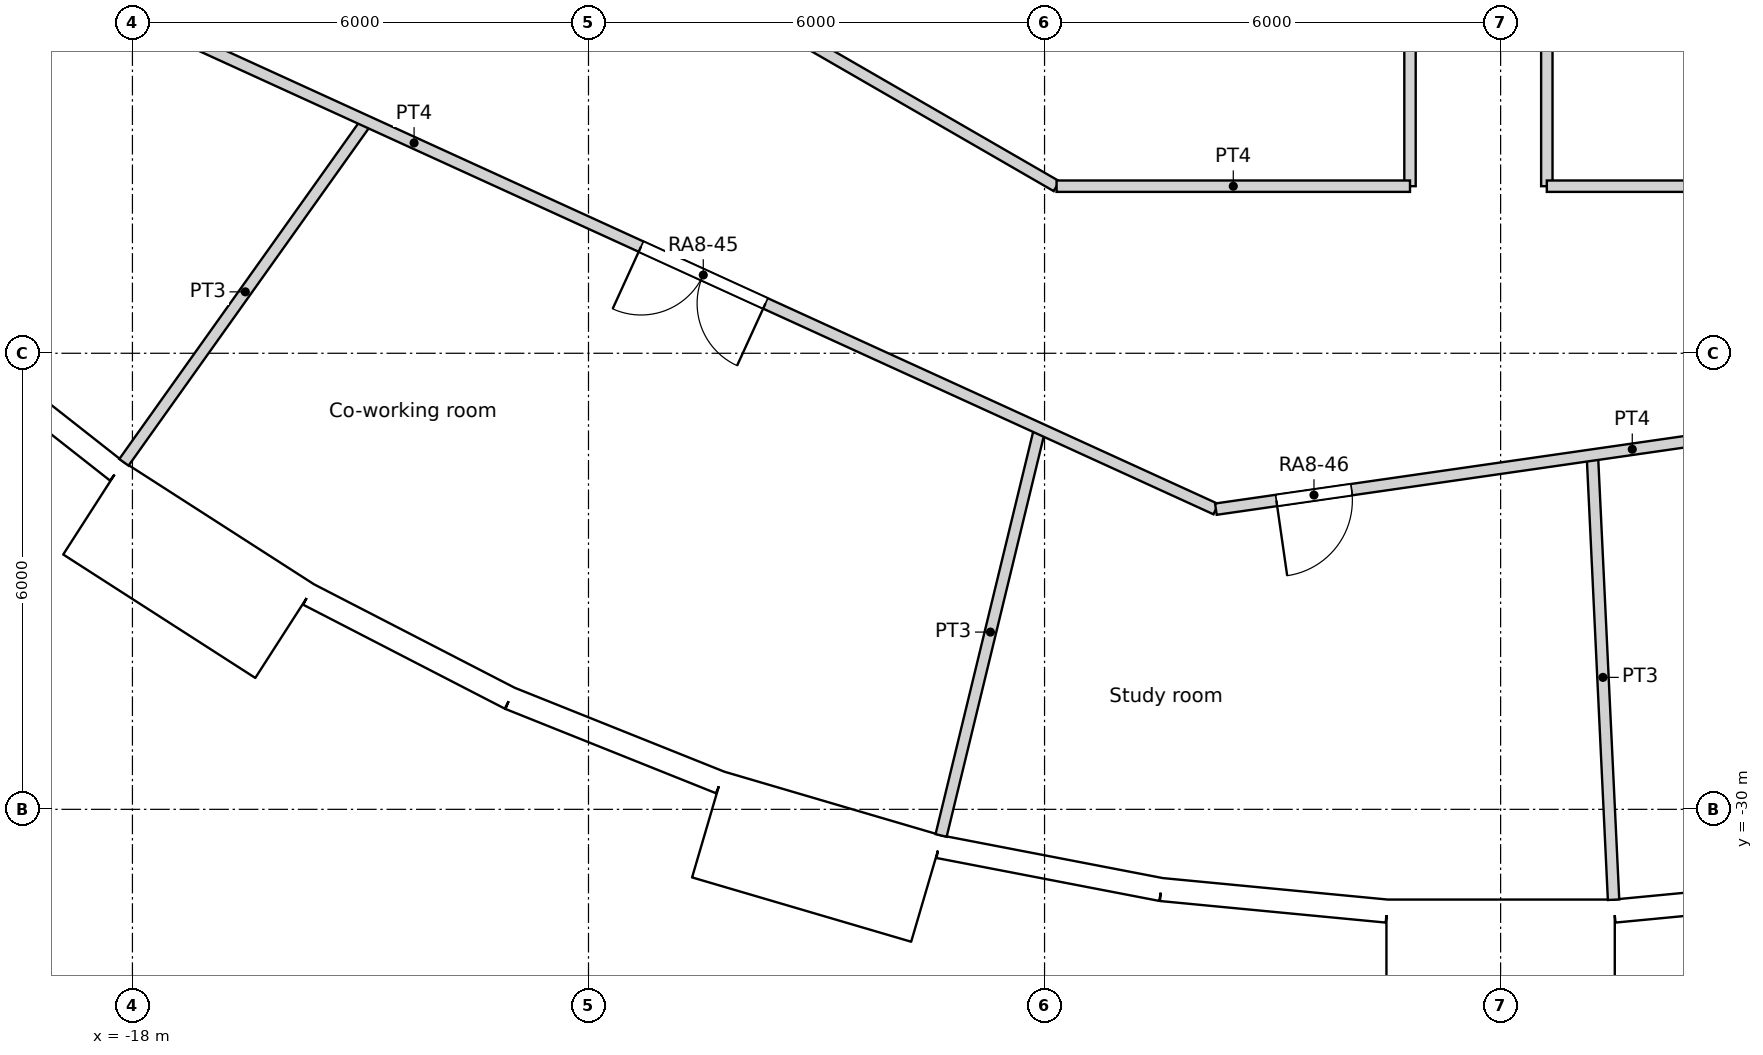
"""IFC4 building model, lengths in metres.
Left out: names, types, materials, properties, quantities, classifications, styles, units other than length and angle.
Written with IfcOpenShell. Run it as: python <this file> out.ifc"""

import sys

from ifc_helpers import new_model, si_unit, direction, frame, frame_2d, origin, origin_2d, place, context, subcontext, project, spatial, rectangle, circle, extrude, element, fill, save


model = new_model("IFC4")
c1 = context("Model", 3, precision=1e-05, world=origin(), true_north=direction((0.0, 1.0)))
c2 = subcontext(c1, "Body", "Model", "MODEL_VIEW")
j1 = project(units=[si_unit("LENGTHUNIT", "METRE"), si_unit("PLANEANGLEUNIT", "RADIAN")], contexts=[c1])
p1 = place(None, origin())
s1 = spatial("IfcSite", under=j1, at=p1, CompositionType="ELEMENT")
p2 = place(p1, origin())
s2 = spatial("IfcBuilding", under=s1, at=p2, CompositionType="ELEMENT")
p3 = place(p2, frame((0.0, 0.0, 103.8)))
s3 = spatial("IfcBuildingStorey", under=s2, at=p3, CompositionType="ELEMENT", Elevation=103.8)
for number, where, z_axis, x_axis in (
    (1, (-15.137, -26.219, 0.0), (0.0, 0.0, 1.0), (1.0, 0.0, 0.0)),
    (2, (-9.902, -28.61, 0.0), (0.0, 0.0, 1.0), (1.0, 0.0, 0.0)),
    (3, (-4.309, -29.966, 0.0), (0.0, 0.0, 1.0), (1.0, 0.0, 0.0)),
    (4, (1.44, -30.24, 0.0), (0.0, 0.0, 1.0), (1.0, 0.0, 0.0)),
):
    element("IfcColumn", number, at=place(p3, frame(where, z_axis=z_axis, x_axis=x_axis)), inside=s3, PredefinedType="COLUMN", context=c2, shape_type="SweptSolid", body=[
        extrude(circle(Radius=0.6, at=origin_2d()), origin(), (0.0, 0.0, 1.0), 3.6),
    ])
for number, where, z_axis, x_axis in (
    (5, (-12.274, -21.259, 0.0), (0.0, 0.0, 1.0), (1.0, 0.0, 0.0)),
    (6, (-7.04, -23.516, 0.0), (0.0, 0.0, 1.0), (1.0, 0.0, 0.0)),
    (7, (-1.427, -24.506, 0.0), (0.0, 0.0, 1.0), (1.0, 0.0, 0.0)),
):
    element("IfcColumn", number, at=place(p3, frame(where, z_axis=z_axis, x_axis=x_axis)), inside=s3, PredefinedType="COLUMN", context=c2, shape_type="SweptSolid", body=[
        extrude(circle(Radius=0.65, at=origin_2d()), origin(), (0.0, 0.0, 1.0), 3.6),
    ])
p4 = place(p3, frame((-20.546, -23.711, 0.0), z_axis=(0.0, 0.0, 1.0), x_axis=(0.786045331304, -0.618168858108, 0.0)))
e8 = element("IfcWall", 8, at=p4, inside=s3, PredefinedType="SOLIDWALL", context=c2, shape_type="SweptSolid", body=[
    extrude(rectangle(XDim=2.98, YDim=0.3, at=frame_2d((1.49, 0.0))), origin(), (0.0, 0.0, 1.0), 3.15),
])
p5 = place(p4, frame((1.49, 0.0, 1.55)))
e9 = element("IfcOpeningElement", 9, at=p5, cuts=e8, PredefinedType="OPENING", context=c2, shape_type="SweptSolid", body=[
    extrude(circle(Radius=0.9, at=origin_2d()), frame((0.0, 0.16, 0.0), z_axis=(0.0, -1.0, 0.0), x_axis=(1.0, 0.0, 0.0)), (0.0, 0.0, 1.0), 0.32),
])
p6 = place(p3, frame((-18.516, -26.037, -0.45), z_axis=(0.0, 0.0, 1.0), x_axis=(0.841223422347, -0.540687667415, 0.0)))
e10 = element("IfcWall", 10, at=p6, inside=s3, PredefinedType="ELEMENTEDWALL", context=c2, shape_type="SweptSolid", body=[
    extrude(rectangle(XDim=3.0, YDim=1.45, at=frame_2d((1.5, 0.0))), origin(), (0.0, 0.0, 1.0), 3.6),
])
p7 = place(p6, frame((1.5, 0.0, 2.0)))
e11 = element("IfcOpeningElement", 11, at=p7, cuts=e10, PredefinedType="OPENING", context=c2, shape_type="SweptSolid", body=[
    extrude(circle(Radius=0.9, at=origin_2d()), frame((0.0, 0.735, 0.0), z_axis=(0.0, -1.0, 0.0), x_axis=(1.0, 0.0, 0.0)), (0.0, 0.0, 1.0), 1.47),
])
p8 = place(p3, frame((-15.682, -27.174, 0.0), z_axis=(0.0, 0.0, 1.0), x_axis=(0.888819853856, -0.458256770153, 0.0)))
e12 = element("IfcWall", 12, at=p8, inside=s3, PredefinedType="SOLIDWALL", context=c2, shape_type="SweptSolid", body=[
    extrude(rectangle(XDim=2.98, YDim=0.3, at=frame_2d((1.49, 0.0))), origin(), (0.0, 0.0, 1.0), 3.15),
])
p9 = place(p8, frame((1.49, 0.0, 1.55)))
e13 = element("IfcOpeningElement", 13, at=p9, cuts=e12, PredefinedType="OPENING", context=c2, shape_type="SweptSolid", body=[
    extrude(circle(Radius=0.9, at=origin_2d()), frame((0.0, 0.16, 0.0), z_axis=(0.0, -1.0, 0.0), x_axis=(1.0, 0.0, 0.0)), (0.0, 0.0, 1.0), 0.32),
])
p10 = place(p3, frame((-13.033, -28.539, 0.0), z_axis=(0.0, 0.0, 1.0), x_axis=(0.928403213937, -0.371574316054, 0.0)))
e14 = element("IfcWall", 14, at=p10, inside=s3, PredefinedType="SOLIDWALL", context=c2, shape_type="SweptSolid", body=[
    extrude(rectangle(XDim=2.98, YDim=0.3, at=frame_2d((1.49, 0.0))), origin(), (0.0, 0.0, 1.0), 3.15),
])
p11 = place(p10, frame((1.49, 0.0, 1.55)))
e15 = element("IfcOpeningElement", 15, at=p11, cuts=e14, PredefinedType="OPENING", context=c2, shape_type="SweptSolid", body=[
    extrude(circle(Radius=0.9, at=origin_2d()), frame((0.0, 0.16, 0.0), z_axis=(0.0, -1.0, 0.0), x_axis=(1.0, 0.0, 0.0)), (0.0, 0.0, 1.0), 0.32),
])
p12 = place(p3, frame((-10.43, -30.198, -0.45), z_axis=(0.0, 0.0, 1.0), x_axis=(0.959489813418, -0.281743319258, 0.0)))
e16 = element("IfcWall", 16, at=p12, inside=s3, PredefinedType="ELEMENTEDWALL", context=c2, shape_type="SweptSolid", body=[
    extrude(rectangle(XDim=3.0, YDim=1.45, at=frame_2d((1.5, 0.0))), origin(), (0.0, 0.0, 1.0), 3.6),
])
p13 = place(p12, frame((1.5, 0.0, 2.0)))
e17 = element("IfcOpeningElement", 17, at=p13, cuts=e16, PredefinedType="OPENING", context=c2, shape_type="SweptSolid", body=[
    extrude(circle(Radius=0.9, at=origin_2d()), frame((0.0, 0.735, 0.0), z_axis=(0.0, -1.0, 0.0), x_axis=(1.0, 0.0, 0.0)), (0.0, 0.0, 1.0), 1.47),
])
p14 = place(p3, frame((-7.391, -30.491, 0.0), z_axis=(0.0, 0.0, 1.0), x_axis=(0.981924535406, -0.189272836848, 0.0)))
e18 = element("IfcWall", 18, at=p14, inside=s3, PredefinedType="SOLIDWALL", context=c2, shape_type="SweptSolid", body=[
    extrude(rectangle(XDim=2.98, YDim=0.3, at=frame_2d((1.49, 0.0))), origin(), (0.0, 0.0, 1.0), 3.15),
])
p15 = place(p14, frame((1.49, 0.0, 1.55)))
e19 = element("IfcOpeningElement", 19, at=p15, cuts=e18, PredefinedType="OPENING", context=c2, shape_type="SweptSolid", body=[
    extrude(circle(Radius=0.9, at=origin_2d()), frame((0.0, 0.16, 0.0), z_axis=(0.0, -1.0, 0.0), x_axis=(1.0, 0.0, 0.0)), (0.0, 0.0, 1.0), 0.32),
])
p16 = place(p3, frame((-4.465, -31.055, 0.0), z_axis=(0.0, 0.0, 1.0), x_axis=(0.995473351551, -0.095041077185, 0.0)))
e20 = element("IfcWall", 20, at=p16, inside=s3, PredefinedType="SOLIDWALL", context=c2, shape_type="SweptSolid", body=[
    extrude(rectangle(XDim=2.98, YDim=0.3, at=frame_2d((1.49, 0.0))), origin(), (0.0, 0.0, 1.0), 3.15),
])
p17 = place(p16, frame((1.49, 0.0, 1.55)))
e21 = element("IfcOpeningElement", 21, at=p17, cuts=e20, PredefinedType="OPENING", context=c2, shape_type="SweptSolid", body=[
    extrude(circle(Radius=0.9, at=origin_2d()), frame((0.0, 0.16, 0.0), z_axis=(0.0, -1.0, 0.0), x_axis=(1.0, 0.0, 0.0)), (0.0, 0.0, 1.0), 0.32),
])
p18 = place(p3, frame((-1.5, -31.914, -0.45), z_axis=(0.0, 0.0, 1.0), x_axis=(1.0, 0.0, 0.0)))
e22 = element("IfcWall", 22, at=p18, inside=s3, PredefinedType="ELEMENTEDWALL", context=c2, shape_type="SweptSolid", body=[
    extrude(rectangle(XDim=3.0, YDim=1.45, at=frame_2d((1.5, 0.0))), origin(), (0.0, 0.0, 1.0), 3.6),
])
p19 = place(p18, frame((1.5, 0.0, 2.0)))
e23 = element("IfcOpeningElement", 23, at=p19, cuts=e22, PredefinedType="OPENING", context=c2, shape_type="SweptSolid", body=[
    extrude(circle(Radius=0.9, at=origin_2d()), frame((0.0, 0.735, 0.0), z_axis=(0.0, -1.0, 0.0), x_axis=(1.0, 0.0, 0.0)), (0.0, 0.0, 1.0), 1.47),
])
p20 = place(p3, frame((1.499, -31.338, 0.0), z_axis=(0.0, 0.0, 1.0), x_axis=(0.995473351551, 0.095041077185, 0.0)))
e24 = element("IfcWall", 24, at=p20, inside=s3, PredefinedType="SOLIDWALL", context=c2, shape_type="SweptSolid", body=[
    extrude(rectangle(XDim=2.98, YDim=0.3, at=frame_2d((1.49, 0.0))), origin(), (0.0, 0.0, 1.0), 3.15),
])
p21 = place(p20, frame((1.49, 0.0, 1.55)))
e25 = element("IfcOpeningElement", 25, at=p21, cuts=e24, PredefinedType="OPENING", context=c2, shape_type="SweptSolid", body=[
    extrude(circle(Radius=0.9, at=origin_2d()), frame((0.0, 0.16, 0.0), z_axis=(0.0, -1.0, 0.0), x_axis=(1.0, 0.0, 0.0)), (0.0, 0.0, 1.0), 0.32),
])
p22 = place(p3, frame((-14.0, -17.092, 0.0), z_axis=(0.0, 0.0, 1.0), x_axis=(0.86602719091, -0.499996904595, 0.0)))
e26 = element("IfcWall", 26, at=p22, inside=s3, PredefinedType="PARTITIONING", context=c2, shape_type="SweptSolid", body=[
    extrude(rectangle(XDim=9.42, YDim=0.15, at=frame_2d((4.71, 0.0))), origin(), (0.0, 0.0, 1.0), 3.15),
])
p23 = place(p3, frame((-5.842, -21.802, 0.0), z_axis=(0.0, 0.0, 1.0), x_axis=(1.0, 0.0, 0.0)))
e27 = element("IfcWall", 27, at=p23, inside=s3, PredefinedType="PARTITIONING", context=c2, shape_type="SweptSolid", body=[
    extrude(rectangle(XDim=4.65, YDim=0.15, at=frame_2d((2.325, 0.0))), origin(), (0.0, 0.0, 1.0), 3.15),
])
p24 = place(p3, frame((-1.192, -21.802, 0.0), z_axis=(0.0, 0.0, 1.0), x_axis=(0.0, 1.0, 0.0)))
e28 = element("IfcWall", 28, at=p24, inside=s3, PredefinedType="PARTITIONING", context=c2, shape_type="SweptSolid", body=[
    extrude(rectangle(XDim=10.002, YDim=0.15, at=frame_2d((5.001, 0.0))), origin(), (0.0, 0.0, 1.0), 3.15),
])
p25 = place(p3, frame((0.608, -21.802, 0.0), z_axis=(0.0, 0.0, 1.0), x_axis=(0.0, 1.0, 0.0)))
e29 = element("IfcWall", 29, at=p25, inside=s3, PredefinedType="PARTITIONING", context=c2, shape_type="SweptSolid", body=[
    extrude(rectangle(XDim=10.002, YDim=0.15, at=frame_2d((5.001, 0.0))), origin(), (0.0, 0.0, 1.0), 3.15),
])
p26 = place(p25, frame((4.526, 0.0, 0.0)))
e30 = element("IfcOpeningElement", 30, at=p26, cuts=e29, PredefinedType="OPENING", context=c2, shape_type="SweptSolid", body=[
    extrude(rectangle(XDim=0.95, YDim=2.1, at=frame_2d((0.475, 1.05))), frame((0.0, 0.075, 0.0), z_axis=(0.0, -1.0, 0.0), x_axis=(1.0, 0.0, 0.0)), (0.0, 0.0, 1.0), 0.15),
])
p27 = place(p3, frame((0.608, -21.802, 0.0), z_axis=(0.0, 0.0, 1.0), x_axis=(1.0, 0.0, 0.0)))
e31 = element("IfcWall", 31, at=p27, inside=s3, PredefinedType="PARTITIONING", context=c2, shape_type="SweptSolid", body=[
    extrude(rectangle(XDim=5.234, YDim=0.15, at=frame_2d((2.617, 0.0))), origin(), (0.0, 0.0, 1.0), 3.15),
])
p28 = place(p3, frame((-17.235, -19.89, 0.0), z_axis=(0.0, 0.0, 1.0), x_axis=(0.909624174921, -0.415432136936, 0.0)))
e32 = element("IfcWall", 32, at=p28, inside=s3, PredefinedType="PARTITIONING", context=c2, shape_type="SweptSolid", body=[
    extrude(rectangle(XDim=14.83, YDim=0.15, at=frame_2d((7.415, 0.0))), origin(), (0.0, 0.0, 1.0), 3.15),
])
p29 = place(p28, frame((6.515, 0.0, 0.0)))
e33 = element("IfcOpeningElement", 33, at=p29, cuts=e32, PredefinedType="OPENING", context=c2, shape_type="SweptSolid", body=[
    extrude(rectangle(XDim=1.8, YDim=2.1, at=frame_2d((0.9, 1.05))), frame((0.0, 0.075, 0.0), z_axis=(0.0, -1.0, 0.0), x_axis=(1.0, 0.0, 0.0)), (0.0, 0.0, 1.0), 0.15),
])
p30 = place(p3, frame((-3.746, -26.051, 0.0), z_axis=(0.0, 0.0, 1.0), x_axis=(0.9898137179, 0.142368549395, 0.0)))
e34 = element("IfcWall", 34, at=p30, inside=s3, PredefinedType="PARTITIONING", context=c2, shape_type="SweptSolid", body=[
    extrude(rectangle(XDim=14.83, YDim=0.15, at=frame_2d((7.415, 0.0))), origin(), (0.0, 0.0, 1.0), 3.15),
])
p31 = place(p30, frame((0.804, 0.0, 0.0)))
e35 = element("IfcOpeningElement", 35, at=p31, cuts=e34, PredefinedType="OPENING", context=c2, shape_type="SweptSolid", body=[
    extrude(rectangle(XDim=1.0, YDim=2.04, at=frame_2d((0.5, 1.02))), frame((0.0, 0.075, 0.0), z_axis=(0.0, -1.0, 0.0), x_axis=(1.0, 0.0, 0.0)), (0.0, 0.0, 1.0), 0.15),
])
p32 = place(p30, frame((9.265, 0.0, 0.0)))
e36 = element("IfcOpeningElement", 36, at=p32, cuts=e34, PredefinedType="OPENING", context=c2, shape_type="SweptSolid", body=[
    extrude(rectangle(XDim=1.8, YDim=2.1, at=frame_2d((0.9, 1.05))), frame((0.0, 0.075, 0.0), z_axis=(0.0, -1.0, 0.0), x_axis=(1.0, 0.0, 0.0)), (0.0, 0.0, 1.0), 0.15),
])
p33 = place(p3, frame((-18.112, -25.435, 0.0), z_axis=(0.0, 0.0, 1.0), x_axis=(0.580004598464, 0.81461320009, 0.0)))
e37 = element("IfcWall", 37, at=p33, inside=s3, PredefinedType="PARTITIONING", context=c2, shape_type="SweptSolid", body=[
    extrude(rectangle(XDim=5.507, YDim=0.15, at=frame_2d((2.753, 0.0))), origin(), (0.0, 0.0, 1.0), 3.15),
])
p34 = place(p3, frame((-7.361, -30.344, 0.0), z_axis=(0.0, 0.0, 1.0), x_axis=(0.235707871895, 0.971823954802, 0.0)))
e38 = element("IfcWall", 38, at=p34, inside=s3, PredefinedType="PARTITIONING", context=c2, shape_type="SweptSolid", body=[
    extrude(rectangle(XDim=5.507, YDim=0.15, at=frame_2d((2.754, 0.0))), origin(), (0.0, 0.0, 1.0), 3.15),
])
p35 = place(p3, frame((1.207, -25.339, 0.0), z_axis=(0.0, 0.0, 1.0), x_axis=(0.047648334785, -0.998864173045, 0.0)))
e39 = element("IfcWall", 39, at=p35, inside=s3, PredefinedType="PARTITIONING", context=c2, shape_type="SweptSolid", body=[
    extrude(rectangle(XDim=5.856, YDim=0.15, at=frame_2d((2.928, 0.0))), origin(), (0.0, 0.0, 1.0), 3.15),
])
p36 = place(p5, origin())
e40 = element("IfcWindow", 40, at=p36, inside=s3, PartitioningType="SINGLE_PANEL", PredefinedType="WINDOW", context=c2, shape_type="SweptSolid", body=[
    extrude(circle(Radius=0.9, at=origin_2d()), frame((0.0, 0.12, 0.0), z_axis=(0.0, -1.0, 0.0), x_axis=(1.0, 0.0, 0.0)), (0.0, 0.0, 1.0), 0.1),
])
fill(e9, e40)
p37 = place(p7, origin())
e41 = element("IfcWindow", 41, at=p37, inside=s3, PartitioningType="SINGLE_PANEL", PredefinedType="WINDOW", context=c2, shape_type="SweptSolid", body=[
    extrude(circle(Radius=0.9, at=origin_2d()), frame((0.0, 0.695, 0.0), z_axis=(0.0, -1.0, 0.0), x_axis=(1.0, 0.0, 0.0)), (0.0, 0.0, 1.0), 0.1),
])
fill(e11, e41)
p38 = place(p9, origin())
e42 = element("IfcWindow", 42, at=p38, inside=s3, PartitioningType="SINGLE_PANEL", PredefinedType="WINDOW", context=c2, shape_type="SweptSolid", body=[
    extrude(circle(Radius=0.9, at=origin_2d()), frame((0.0, 0.12, 0.0), z_axis=(0.0, -1.0, 0.0), x_axis=(1.0, 0.0, 0.0)), (0.0, 0.0, 1.0), 0.1),
])
fill(e13, e42)
p39 = place(p11, origin())
e43 = element("IfcWindow", 43, at=p39, inside=s3, PartitioningType="SINGLE_PANEL", PredefinedType="WINDOW", context=c2, shape_type="SweptSolid", body=[
    extrude(circle(Radius=0.9, at=origin_2d()), frame((0.0, 0.12, 0.0), z_axis=(0.0, -1.0, 0.0), x_axis=(1.0, 0.0, 0.0)), (0.0, 0.0, 1.0), 0.1),
])
fill(e15, e43)
p40 = place(p13, origin())
e44 = element("IfcWindow", 44, at=p40, inside=s3, PartitioningType="SINGLE_PANEL", PredefinedType="WINDOW", context=c2, shape_type="SweptSolid", body=[
    extrude(circle(Radius=0.9, at=origin_2d()), frame((0.0, 0.695, 0.0), z_axis=(0.0, -1.0, 0.0), x_axis=(1.0, 0.0, 0.0)), (0.0, 0.0, 1.0), 0.1),
])
fill(e17, e44)
p41 = place(p15, origin())
e45 = element("IfcWindow", 45, at=p41, inside=s3, PartitioningType="SINGLE_PANEL", PredefinedType="WINDOW", context=c2, shape_type="SweptSolid", body=[
    extrude(circle(Radius=0.9, at=origin_2d()), frame((0.0, 0.12, 0.0), z_axis=(0.0, -1.0, 0.0), x_axis=(1.0, 0.0, 0.0)), (0.0, 0.0, 1.0), 0.1),
])
fill(e19, e45)
p42 = place(p17, origin())
e46 = element("IfcWindow", 46, at=p42, inside=s3, PartitioningType="SINGLE_PANEL", PredefinedType="WINDOW", context=c2, shape_type="SweptSolid", body=[
    extrude(circle(Radius=0.9, at=origin_2d()), frame((0.0, 0.12, 0.0), z_axis=(0.0, -1.0, 0.0), x_axis=(1.0, 0.0, 0.0)), (0.0, 0.0, 1.0), 0.1),
])
fill(e21, e46)
p43 = place(p19, origin())
e47 = element("IfcWindow", 47, at=p43, inside=s3, PartitioningType="SINGLE_PANEL", PredefinedType="WINDOW", context=c2, shape_type="SweptSolid", body=[
    extrude(circle(Radius=0.9, at=origin_2d()), frame((0.0, 0.695, 0.0), z_axis=(0.0, -1.0, 0.0), x_axis=(1.0, 0.0, 0.0)), (0.0, 0.0, 1.0), 0.1),
])
fill(e23, e47)
p44 = place(p21, origin())
e48 = element("IfcWindow", 48, at=p44, inside=s3, PartitioningType="SINGLE_PANEL", PredefinedType="WINDOW", context=c2, shape_type="SweptSolid", body=[
    extrude(circle(Radius=0.9, at=origin_2d()), frame((0.0, 0.12, 0.0), z_axis=(0.0, -1.0, 0.0), x_axis=(1.0, 0.0, 0.0)), (0.0, 0.0, 1.0), 0.1),
])
fill(e25, e48)
p45 = place(p29, origin())
e49 = element("IfcDoor", 49, at=p45, inside=s3, OperationType="DOUBLE_DOOR_SINGLE_SWING", PredefinedType="DOOR", context=c2, shape_type="SweptSolid", body=[
    extrude(rectangle(XDim=1.8, YDim=2.1, at=frame_2d((0.9, 1.05))), frame((0.0, 0.025, 0.0), z_axis=(0.0, -1.0, 0.0), x_axis=(1.0, 0.0, 0.0)), (0.0, 0.0, 1.0), 0.05),
])
fill(e33, e49)
p46 = place(p31, origin())
e50 = element("IfcDoor", 50, at=p46, inside=s3, OperationType="SINGLE_SWING_RIGHT", PredefinedType="DOOR", context=c2, shape_type="SweptSolid", body=[
    extrude(rectangle(XDim=1.0, YDim=2.04, at=frame_2d((0.5, 1.02))), frame((0.0, 0.025, 0.0), z_axis=(0.0, -1.0, 0.0), x_axis=(1.0, 0.0, 0.0)), (0.0, 0.0, 1.0), 0.05),
])
fill(e35, e50)
save(model, sys.argv[1])
